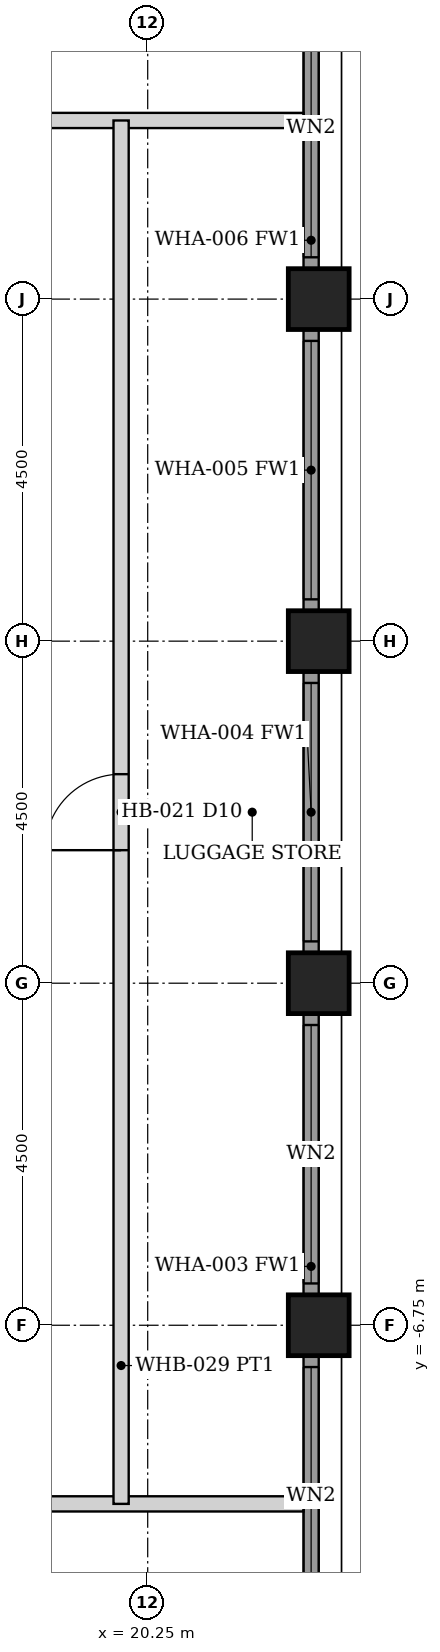
"""IFC4 building model, lengths in metres.
Left out: names, types, materials, properties, quantities, classifications, styles, units other than length and angle.
Written with IfcOpenShell. Run it as: python <this file> out.ifc"""

import sys

from ifc_helpers import new_model, si_unit, direction, frame, frame_2d, origin, origin_2d, place, context, subcontext, project, spatial, rectangle, hollow_rectangle, extrude, element, fill, save


model = new_model("IFC4")
c1 = context("Model", 3, precision=1e-05, world=origin(), true_north=direction((0.0, 1.0)))
c2 = subcontext(c1, "Body", "Model", "MODEL_VIEW")
j1 = project(units=[si_unit("LENGTHUNIT", "METRE"), si_unit("PLANEANGLEUNIT", "RADIAN")], contexts=[c1])
p1 = place(None, origin())
s1 = spatial("IfcSite", under=j1, at=p1, CompositionType="ELEMENT")
p2 = place(p1, origin())
s2 = spatial("IfcBuilding", under=s1, at=p2, CompositionType="ELEMENT")
p3 = place(p2, frame((0.0, 0.0, 129.2)))
s3 = spatial("IfcBuildingStorey", under=s2, at=p3, CompositionType="ELEMENT", Elevation=129.2)
for number, where, z_axis, x_axis in (
    (1, (22.5, -6.75, 0.0), (0.0, 0.0, 1.0), (1.0, 0.0, 0.0)),
    (2, (22.5, -2.25, 0.0), (0.0, 0.0, 1.0), (1.0, 0.0, 0.0)),
    (3, (22.5, 2.25, 0.0), (0.0, 0.0, 1.0), (1.0, 0.0, 0.0)),
    (4, (22.5, 6.75, 0.0), (0.0, 0.0, 1.0), (1.0, 0.0, 0.0)),
):
    element("IfcColumn", number, at=place(p3, frame(where, z_axis=z_axis, x_axis=x_axis)), inside=s3, PredefinedType="COLUMN", context=c2, shape_type="SweptSolid", body=[
        extrude(hollow_rectangle(XDim=0.8, YDim=0.8, WallThickness=0.06, at=origin_2d()), origin(), (0.0, 0.0, 1.0), 3.6),
    ])
p4 = place(p3, frame((22.4, -10.845, 0.0), z_axis=(0.0, 0.0, 1.0), x_axis=(0.0, 1.0, 0.0)))
e5 = element("IfcWall", 5, at=p4, inside=s3, PredefinedType="SOLIDWALL", context=c2, shape_type="SweptSolid", body=[
    extrude(rectangle(XDim=3.69, YDim=0.2, at=frame_2d((1.845, 0.0))), origin(), (0.0, 0.0, 1.0), 2.479),
])
p5 = place(p4, frame((0.145, 0.0, 0.3)))
e6 = element("IfcOpeningElement", 6, at=p5, cuts=e5, PredefinedType="OPENING", context=c2, shape_type="SweptSolid", body=[
    extrude(rectangle(XDim=3.4, YDim=2.029, at=frame_2d((1.7, 1.015))), frame((0.0, 0.11, 0.0), z_axis=(0.0, -1.0, 0.0), x_axis=(1.0, 0.0, 0.0)), (0.0, 0.0, 1.0), 0.22),
])
p6 = place(p3, frame((22.4, -6.345, 0.0), z_axis=(0.0, 0.0, 1.0), x_axis=(0.0, 1.0, 0.0)))
e7 = element("IfcWall", 7, at=p6, inside=s3, PredefinedType="SOLIDWALL", context=c2, shape_type="SweptSolid", body=[
    extrude(rectangle(XDim=3.69, YDim=0.2, at=frame_2d((1.845, 0.0))), origin(), (0.0, 0.0, 1.0), 2.479),
])
p7 = place(p6, frame((0.145, 0.0, 0.3)))
e8 = element("IfcOpeningElement", 8, at=p7, cuts=e7, PredefinedType="OPENING", context=c2, shape_type="SweptSolid", body=[
    extrude(rectangle(XDim=3.4, YDim=2.029, at=frame_2d((1.7, 1.015))), frame((0.0, 0.11, 0.0), z_axis=(0.0, -1.0, 0.0), x_axis=(1.0, 0.0, 0.0)), (0.0, 0.0, 1.0), 0.22),
])
p8 = place(p3, frame((22.4, -1.845, 0.0), z_axis=(0.0, 0.0, 1.0), x_axis=(0.0, 1.0, 0.0)))
e9 = element("IfcWall", 9, at=p8, inside=s3, PredefinedType="SOLIDWALL", context=c2, shape_type="SweptSolid", body=[
    extrude(rectangle(XDim=3.69, YDim=0.2, at=frame_2d((1.845, 0.0))), origin(), (0.0, 0.0, 1.0), 2.479),
])
p9 = place(p8, frame((0.145, 0.0, 0.3)))
e10 = element("IfcOpeningElement", 10, at=p9, cuts=e9, PredefinedType="OPENING", context=c2, shape_type="SweptSolid", body=[
    extrude(rectangle(XDim=3.4, YDim=2.029, at=frame_2d((1.7, 1.015))), frame((0.0, 0.11, 0.0), z_axis=(0.0, -1.0, 0.0), x_axis=(1.0, 0.0, 0.0)), (0.0, 0.0, 1.0), 0.22),
])
p10 = place(p3, frame((22.4, 2.655, 0.0), z_axis=(0.0, 0.0, 1.0), x_axis=(0.0, 1.0, 0.0)))
e11 = element("IfcWall", 11, at=p10, inside=s3, PredefinedType="SOLIDWALL", context=c2, shape_type="SweptSolid", body=[
    extrude(rectangle(XDim=3.69, YDim=0.2, at=frame_2d((1.845, 0.0))), origin(), (0.0, 0.0, 1.0), 2.479),
])
p11 = place(p10, frame((0.145, 0.0, 0.3)))
e12 = element("IfcOpeningElement", 12, at=p11, cuts=e11, PredefinedType="OPENING", context=c2, shape_type="SweptSolid", body=[
    extrude(rectangle(XDim=3.4, YDim=2.029, at=frame_2d((1.7, 1.015))), frame((0.0, 0.11, 0.0), z_axis=(0.0, -1.0, 0.0), x_axis=(1.0, 0.0, 0.0)), (0.0, 0.0, 1.0), 0.22),
])
p12 = place(p3, frame((22.4, 7.155, 0.0), z_axis=(0.0, 0.0, 1.0), x_axis=(0.0, 1.0, 0.0)))
e13 = element("IfcWall", 13, at=p12, inside=s3, PredefinedType="SOLIDWALL", context=c2, shape_type="SweptSolid", body=[
    extrude(rectangle(XDim=3.69, YDim=0.2, at=frame_2d((1.845, 0.0))), origin(), (0.0, 0.0, 1.0), 2.479),
])
p13 = place(p12, frame((0.145, 0.0, 0.3)))
e14 = element("IfcOpeningElement", 14, at=p13, cuts=e13, PredefinedType="OPENING", context=c2, shape_type="SweptSolid", body=[
    extrude(rectangle(XDim=3.4, YDim=2.029, at=frame_2d((1.7, 1.015))), frame((0.0, 0.11, 0.0), z_axis=(0.0, -1.0, 0.0), x_axis=(1.0, 0.0, 0.0)), (0.0, 0.0, 1.0), 0.22),
])
p14 = place(p3, frame((-22.3, 9.1, 0.0), z_axis=(0.0, 0.0, 1.0), x_axis=(1.0, 0.0, 0.0)))
e15 = element("IfcWall", 15, at=p14, inside=s3, PredefinedType="PARTITIONING", context=c2, shape_type="SweptSolid", body=[
    extrude(rectangle(XDim=44.6, YDim=0.2, at=frame_2d((22.3, 0.0))), origin(), (0.0, 0.0, 1.0), 2.473),
])
p15 = place(p14, frame((6.75, 0.0, 0.0)))
e16 = element("IfcOpeningElement", 16, at=p15, cuts=e15, PredefinedType="OPENING", context=c2, shape_type="SweptSolid", body=[
    extrude(rectangle(XDim=0.9, YDim=2.1, at=frame_2d((0.45, 1.05))), frame((0.0, 0.11, 0.0), z_axis=(0.0, -1.0, 0.0), x_axis=(1.0, 0.0, 0.0)), (0.0, 0.0, 1.0), 0.22),
])
p16 = place(p14, frame((14.45, 0.0, 0.0)))
e17 = element("IfcOpeningElement", 17, at=p16, cuts=e15, PredefinedType="OPENING", context=c2, shape_type="SweptSolid", body=[
    extrude(rectangle(XDim=0.9, YDim=2.1, at=frame_2d((0.45, 1.05))), frame((0.0, 0.11, 0.0), z_axis=(0.0, -1.0, 0.0), x_axis=(1.0, 0.0, 0.0)), (0.0, 0.0, 1.0), 0.22),
])
p17 = place(p14, frame((15.75, 0.0, 0.0)))
e18 = element("IfcOpeningElement", 18, at=p17, cuts=e15, PredefinedType="OPENING", context=c2, shape_type="SweptSolid", body=[
    extrude(rectangle(XDim=0.9, YDim=2.1, at=frame_2d((0.45, 1.05))), frame((0.0, 0.11, 0.0), z_axis=(0.0, -1.0, 0.0), x_axis=(1.0, 0.0, 0.0)), (0.0, 0.0, 1.0), 0.22),
])
p18 = place(p14, frame((32.45, 0.0, 0.0)))
e19 = element("IfcOpeningElement", 19, at=p18, cuts=e15, PredefinedType="OPENING", context=c2, shape_type="SweptSolid", body=[
    extrude(rectangle(XDim=0.9, YDim=2.1, at=frame_2d((0.45, 1.05))), frame((0.0, 0.11, 0.0), z_axis=(0.0, -1.0, 0.0), x_axis=(1.0, 0.0, 0.0)), (0.0, 0.0, 1.0), 0.22),
])
p19 = place(p14, frame((33.75, 0.0, 0.0)))
e20 = element("IfcOpeningElement", 20, at=p19, cuts=e15, PredefinedType="OPENING", context=c2, shape_type="SweptSolid", body=[
    extrude(rectangle(XDim=0.9, YDim=2.1, at=frame_2d((0.45, 1.05))), frame((0.0, 0.11, 0.0), z_axis=(0.0, -1.0, 0.0), x_axis=(1.0, 0.0, 0.0)), (0.0, 0.0, 1.0), 0.22),
])
p20 = place(p14, frame((38.85, 0.0, 0.0)))
e21 = element("IfcOpeningElement", 21, at=p20, cuts=e15, PredefinedType="OPENING", context=c2, shape_type="SweptSolid", body=[
    extrude(rectangle(XDim=0.9, YDim=2.1, at=frame_2d((0.45, 1.05))), frame((0.0, 0.11, 0.0), z_axis=(0.0, -1.0, 0.0), x_axis=(1.0, 0.0, 0.0)), (0.0, 0.0, 1.0), 0.22),
])
p21 = place(p14, frame((4.85, 0.0, 0.0)))
e22 = element("IfcOpeningElement", 22, at=p21, cuts=e15, PredefinedType="OPENING", context=c2, shape_type="SweptSolid", body=[
    extrude(rectangle(XDim=0.9, YDim=2.1, at=frame_2d((0.45, 1.05))), frame((0.0, 0.11, 0.0), z_axis=(0.0, -1.0, 0.0), x_axis=(1.0, 0.0, 0.0)), (0.0, 0.0, 1.0), 0.22),
])
p22 = place(p3, frame((-22.3, -9.1, 0.0), z_axis=(0.0, 0.0, 1.0), x_axis=(1.0, 0.0, 0.0)))
e23 = element("IfcWall", 23, at=p22, inside=s3, PredefinedType="PARTITIONING", context=c2, shape_type="SweptSolid", body=[
    extrude(rectangle(XDim=44.6, YDim=0.2, at=frame_2d((22.3, 0.0))), origin(), (0.0, 0.0, 1.0), 2.473),
])
p23 = place(p22, frame((9.95, 0.0, 0.0)))
e24 = element("IfcOpeningElement", 24, at=p23, cuts=e23, PredefinedType="OPENING", context=c2, shape_type="SweptSolid", body=[
    extrude(rectangle(XDim=0.9, YDim=2.1, at=frame_2d((0.45, 1.05))), frame((0.0, 0.11, 0.0), z_axis=(0.0, -1.0, 0.0), x_axis=(1.0, 0.0, 0.0)), (0.0, 0.0, 1.0), 0.22),
])
p24 = place(p22, frame((11.25, 0.0, 0.0)))
e25 = element("IfcOpeningElement", 25, at=p24, cuts=e23, PredefinedType="OPENING", context=c2, shape_type="SweptSolid", body=[
    extrude(rectangle(XDim=0.9, YDim=2.1, at=frame_2d((0.45, 1.05))), frame((0.0, 0.11, 0.0), z_axis=(0.0, -1.0, 0.0), x_axis=(1.0, 0.0, 0.0)), (0.0, 0.0, 1.0), 0.22),
])
p25 = place(p22, frame((27.95, 0.0, 0.0)))
e26 = element("IfcOpeningElement", 26, at=p25, cuts=e23, PredefinedType="OPENING", context=c2, shape_type="SweptSolid", body=[
    extrude(rectangle(XDim=0.9, YDim=2.1, at=frame_2d((0.45, 1.05))), frame((0.0, 0.11, 0.0), z_axis=(0.0, -1.0, 0.0), x_axis=(1.0, 0.0, 0.0)), (0.0, 0.0, 1.0), 0.22),
])
p26 = place(p22, frame((29.25, 0.0, 0.0)))
e27 = element("IfcOpeningElement", 27, at=p26, cuts=e23, PredefinedType="OPENING", context=c2, shape_type="SweptSolid", body=[
    extrude(rectangle(XDim=0.9, YDim=2.1, at=frame_2d((0.45, 1.05))), frame((0.0, 0.11, 0.0), z_axis=(0.0, -1.0, 0.0), x_axis=(1.0, 0.0, 0.0)), (0.0, 0.0, 1.0), 0.22),
])
p27 = place(p22, frame((36.95, 0.0, 0.0)))
e28 = element("IfcOpeningElement", 28, at=p27, cuts=e23, PredefinedType="OPENING", context=c2, shape_type="SweptSolid", body=[
    extrude(rectangle(XDim=0.9, YDim=2.1, at=frame_2d((0.45, 1.05))), frame((0.0, 0.11, 0.0), z_axis=(0.0, -1.0, 0.0), x_axis=(1.0, 0.0, 0.0)), (0.0, 0.0, 1.0), 0.22),
])
p28 = place(p22, frame((38.85, 0.0, 0.0)))
e29 = element("IfcOpeningElement", 29, at=p28, cuts=e23, PredefinedType="OPENING", context=c2, shape_type="SweptSolid", body=[
    extrude(rectangle(XDim=0.9, YDim=2.1, at=frame_2d((0.45, 1.05))), frame((0.0, 0.11, 0.0), z_axis=(0.0, -1.0, 0.0), x_axis=(1.0, 0.0, 0.0)), (0.0, 0.0, 1.0), 0.22),
])
p29 = place(p22, frame((4.85, 0.0, 0.0)))
e30 = element("IfcOpeningElement", 30, at=p29, cuts=e23, PredefinedType="OPENING", context=c2, shape_type="SweptSolid", body=[
    extrude(rectangle(XDim=0.9, YDim=2.1, at=frame_2d((0.45, 1.05))), frame((0.0, 0.11, 0.0), z_axis=(0.0, -1.0, 0.0), x_axis=(1.0, 0.0, 0.0)), (0.0, 0.0, 1.0), 0.22),
])
p30 = place(p3, frame((19.9, -9.1, 0.0), z_axis=(0.0, 0.0, 1.0), x_axis=(0.0, 1.0, 0.0)))
e31 = element("IfcWall", 31, at=p30, inside=s3, PredefinedType="PARTITIONING", context=c2, shape_type="SweptSolid", body=[
    extrude(rectangle(XDim=18.2, YDim=0.2, at=frame_2d((9.1, 0.0))), origin(), (0.0, 0.0, 1.0), 2.473),
])
p31 = place(p30, frame((8.6, 0.0, 0.0)))
e32 = element("IfcOpeningElement", 32, at=p31, cuts=e31, PredefinedType="OPENING", context=c2, shape_type="SweptSolid", body=[
    extrude(rectangle(XDim=1.0, YDim=2.1, at=frame_2d((0.5, 1.05))), frame((0.0, 0.11, 0.0), z_axis=(0.0, -1.0, 0.0), x_axis=(1.0, 0.0, 0.0)), (0.0, 0.0, 1.0), 0.22),
])
p32 = place(p5, origin())
e33 = element("IfcWindow", 33, at=p32, inside=s3, PartitioningType="SINGLE_PANEL", PredefinedType="WINDOW", context=c2, shape_type="SweptSolid", body=[
    extrude(rectangle(XDim=3.4, YDim=2.029, at=frame_2d((1.7, 1.015))), frame((0.0, 0.03, 0.0), z_axis=(0.0, -1.0, 0.0), x_axis=(1.0, 0.0, 0.0)), (0.0, 0.0, 1.0), 0.06),
])
fill(e6, e33)
p33 = place(p7, origin())
e34 = element("IfcWindow", 34, at=p33, inside=s3, PartitioningType="SINGLE_PANEL", PredefinedType="WINDOW", context=c2, shape_type="SweptSolid", body=[
    extrude(rectangle(XDim=3.4, YDim=2.029, at=frame_2d((1.7, 1.015))), frame((0.0, 0.03, 0.0), z_axis=(0.0, -1.0, 0.0), x_axis=(1.0, 0.0, 0.0)), (0.0, 0.0, 1.0), 0.06),
])
fill(e8, e34)
p34 = place(p9, origin())
e35 = element("IfcWindow", 35, at=p34, inside=s3, PartitioningType="SINGLE_PANEL", PredefinedType="WINDOW", context=c2, shape_type="SweptSolid", body=[
    extrude(rectangle(XDim=3.4, YDim=2.029, at=frame_2d((1.7, 1.015))), frame((0.0, 0.03, 0.0), z_axis=(0.0, -1.0, 0.0), x_axis=(1.0, 0.0, 0.0)), (0.0, 0.0, 1.0), 0.06),
])
fill(e10, e35)
p35 = place(p11, origin())
e36 = element("IfcWindow", 36, at=p35, inside=s3, PartitioningType="SINGLE_PANEL", PredefinedType="WINDOW", context=c2, shape_type="SweptSolid", body=[
    extrude(rectangle(XDim=3.4, YDim=2.029, at=frame_2d((1.7, 1.015))), frame((0.0, 0.03, 0.0), z_axis=(0.0, -1.0, 0.0), x_axis=(1.0, 0.0, 0.0)), (0.0, 0.0, 1.0), 0.06),
])
fill(e12, e36)
p36 = place(p13, origin())
e37 = element("IfcWindow", 37, at=p36, inside=s3, PartitioningType="SINGLE_PANEL", PredefinedType="WINDOW", context=c2, shape_type="SweptSolid", body=[
    extrude(rectangle(XDim=3.4, YDim=2.029, at=frame_2d((1.7, 1.015))), frame((0.0, 0.03, 0.0), z_axis=(0.0, -1.0, 0.0), x_axis=(1.0, 0.0, 0.0)), (0.0, 0.0, 1.0), 0.06),
])
fill(e14, e37)
p37 = place(p31, origin())
e38 = element("IfcDoor", 38, at=p37, inside=s3, OperationType="SINGLE_SWING_LEFT", PredefinedType="DOOR", context=c2, shape_type="SweptSolid", body=[
    extrude(rectangle(XDim=1.0, YDim=2.1, at=frame_2d((0.5, 1.05))), frame((0.0, 0.025, 0.0), z_axis=(0.0, -1.0, 0.0), x_axis=(1.0, 0.0, 0.0)), (0.0, 0.0, 1.0), 0.05),
])
fill(e32, e38)
save(model, sys.argv[1])
